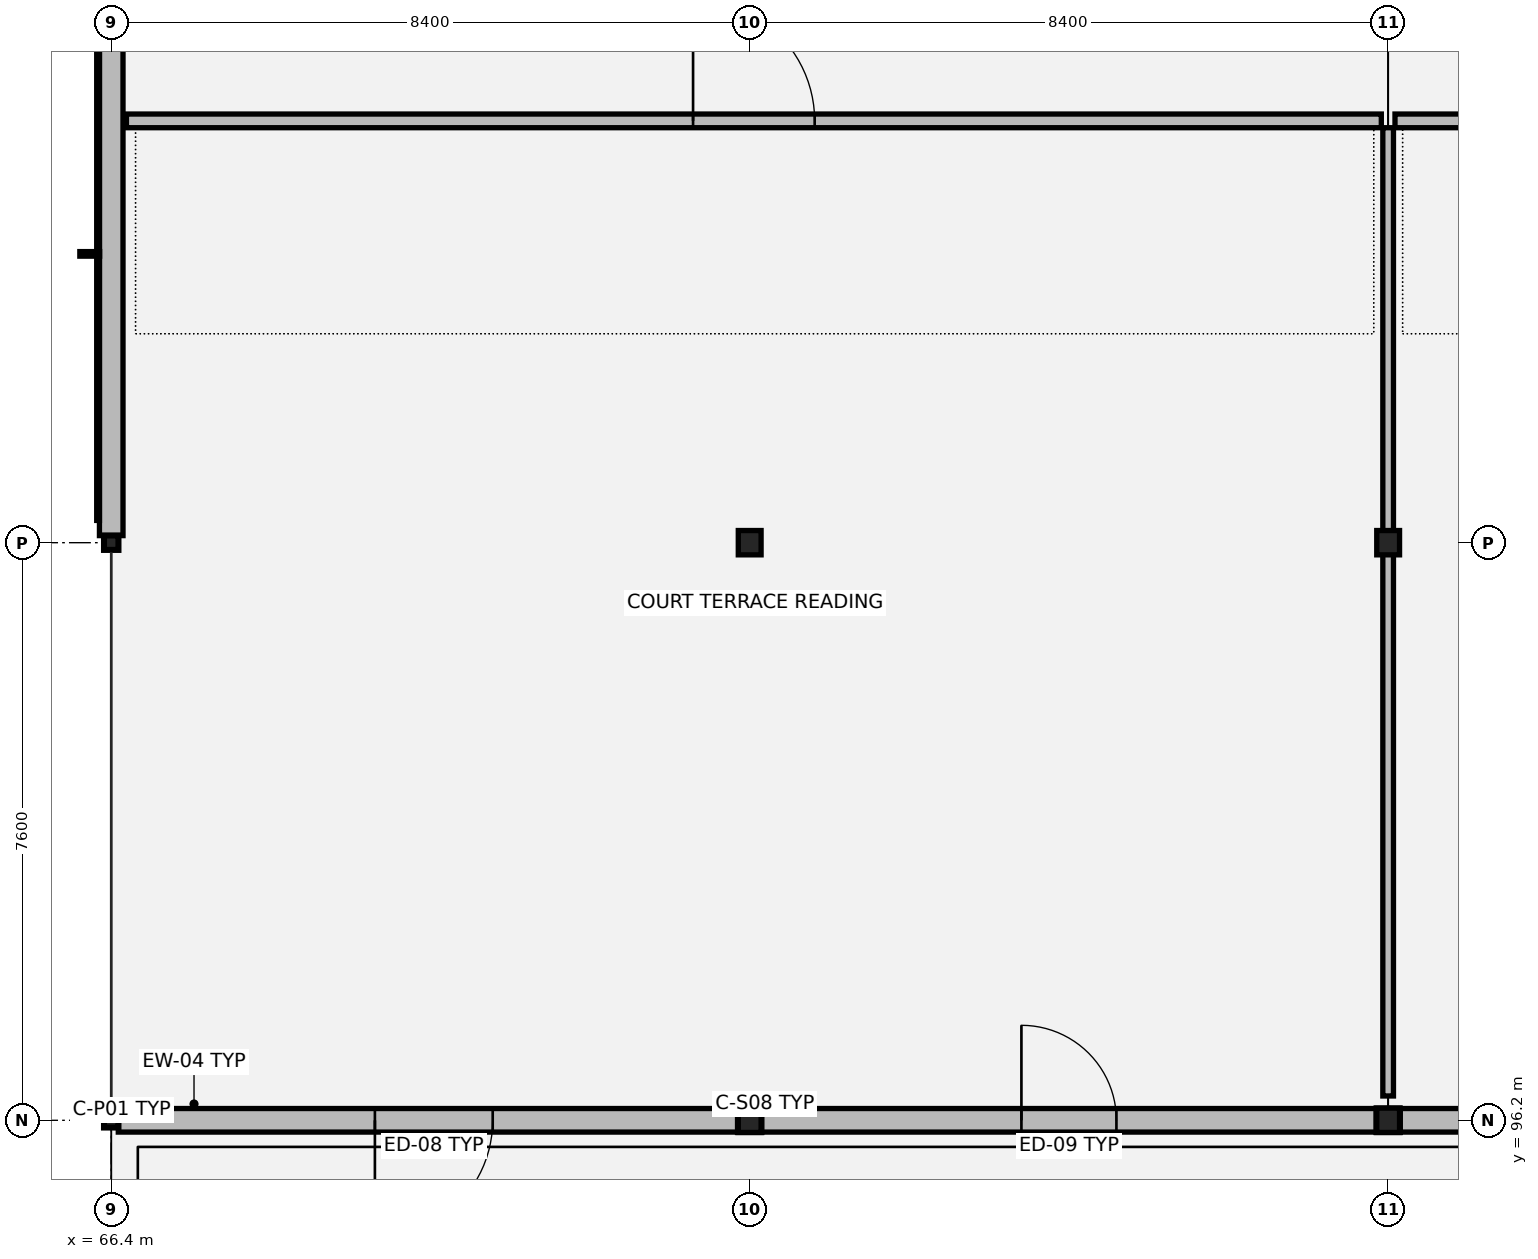
"""IFC4 building model, lengths in metres.
Left out: names, types, materials, properties, quantities, classifications, styles, units other than length and angle.
Written with IfcOpenShell. Run it as: python <this file> out.ifc"""

import sys

from ifc_helpers import new_model, si_unit, direction, frame, frame_2d, origin, origin_2d, place, context, subcontext, project, spatial, rectangle, hollow_rectangle, i_section, extrude, element, fill, save


model = new_model("IFC4")
c1 = context("Model", 3, precision=1e-05, world=origin(), true_north=direction((0.0, 1.0)))
c2 = subcontext(c1, "Body", "Model", "MODEL_VIEW")
j1 = project(units=[si_unit("LENGTHUNIT", "METRE"), si_unit("PLANEANGLEUNIT", "RADIAN")], contexts=[c1])
p1 = place(None, origin())
s1 = spatial("IfcSite", under=j1, at=p1, CompositionType="ELEMENT")
p2 = place(p1, origin())
s2 = spatial("IfcBuilding", under=s1, at=p2, CompositionType="ELEMENT")
p3 = place(p2, frame((0.0, 0.0, 17.34)))
s3 = spatial("IfcBuildingStorey", under=s2, at=p3, CompositionType="ELEMENT", Elevation=17.34)
for number, where, z_axis, x_axis in (
    (1, (66.4, 96.2, 0.0), (0.0, 0.0, 1.0), (1.0, 0.0, 0.0)),
    (2, (66.4, 103.8, 0.0), (0.0, 0.0, 1.0), (1.0, 0.0, 0.0)),
):
    element("IfcColumn", number, at=place(p3, frame(where, z_axis=z_axis, x_axis=x_axis)), inside=s3, PredefinedType="COLUMN", context=c2, shape_type="SweptSolid", body=[
        extrude(hollow_rectangle(XDim=0.18, YDim=0.18, WallThickness=0.01, at=origin_2d()), origin(), (0.0, 0.0, 1.0), 3.875),
    ])
p4 = place(p3, frame((74.8, 96.2, 0.0), z_axis=(0.0, 0.0, 1.0), x_axis=(1.0, 0.0, 0.0)))
e3 = element("IfcColumn", 3, at=p4, inside=s3, PredefinedType="COLUMN", context=c2, shape_type="SweptSolid", body=[
    extrude(i_section(OverallWidth=0.3, OverallDepth=0.32, WebThickness=0.011, FlangeThickness=0.021, at=origin_2d()), origin(), (0.0, 0.0, 1.0), 3.875),
])
p5 = place(p3, frame((74.8, 103.8, 0.0), z_axis=(0.0, 0.0, 1.0), x_axis=(1.0, 0.0, 0.0)))
e4 = element("IfcColumn", 4, at=p5, inside=s3, PredefinedType="COLUMN", context=c2, shape_type="SweptSolid", body=[
    extrude(i_section(OverallWidth=0.3, OverallDepth=0.32, WebThickness=0.011, FlangeThickness=0.021, at=origin_2d()), origin(), (0.0, 0.0, 1.0), 4.055),
])
p6 = place(p3, frame((83.2, 96.2, 0.0), z_axis=(0.0, 0.0, 1.0), x_axis=(1.0, 0.0, 0.0)))
e5 = element("IfcColumn", 5, at=p6, inside=s3, PredefinedType="COLUMN", context=c2, shape_type="SweptSolid", body=[
    extrude(i_section(OverallWidth=0.3, OverallDepth=0.32, WebThickness=0.011, FlangeThickness=0.021, at=origin_2d()), origin(), (0.0, 0.0, 1.0), 3.875),
])
p7 = place(p3, frame((83.2, 103.8, 0.0), z_axis=(0.0, 0.0, 1.0), x_axis=(1.0, 0.0, 0.0)))
e6 = element("IfcColumn", 6, at=p7, inside=s3, PredefinedType="COLUMN", context=c2, shape_type="SweptSolid", body=[
    extrude(i_section(OverallWidth=0.3, OverallDepth=0.32, WebThickness=0.011, FlangeThickness=0.021, at=origin_2d()), origin(), (0.0, 0.0, 1.0), 4.055),
])
p8 = place(p3, frame((66.493, 96.2, 0.0), z_axis=(0.0, 0.0, 1.0), x_axis=(1.0, 0.0, 0.0)))
e7 = element("IfcWall", 7, at=p8, inside=s3, PredefinedType="SOLIDWALL", context=c2, shape_type="SweptSolid", body=[
    extrude(rectangle(XDim=8.302, YDim=0.31, at=frame_2d((4.151, 0.0))), origin(), (0.0, 0.0, 1.0), 3.27),
])
p9 = place(p8, frame((3.376, 0.0, 0.0)))
e8 = element("IfcOpeningElement", 8, at=p9, cuts=e7, PredefinedType="OPENING", context=c2, shape_type="SweptSolid", body=[
    extrude(rectangle(XDim=1.55, YDim=2.28, at=frame_2d((0.775, 1.14))), frame((0.0, 0.165, 0.0), z_axis=(0.0, -1.0, 0.0), x_axis=(1.0, 0.0, 0.0)), (0.0, 0.0, 1.0), 0.33),
])
p10 = place(p3, frame((74.805, 96.2, 0.0), z_axis=(0.0, 0.0, 1.0), x_axis=(1.0, 0.0, 0.0)))
e9 = element("IfcWall", 9, at=p10, inside=s3, PredefinedType="SOLIDWALL", context=c2, shape_type="SweptSolid", body=[
    extrude(rectangle(XDim=8.39, YDim=0.31, at=frame_2d((4.195, 0.0))), origin(), (0.0, 0.0, 1.0), 3.27),
])
p11 = place(p10, frame((3.57, 0.0, 0.0)))
e10 = element("IfcOpeningElement", 10, at=p11, cuts=e9, PredefinedType="OPENING", context=c2, shape_type="SweptSolid", body=[
    extrude(rectangle(XDim=1.25, YDim=2.2, at=frame_2d((0.625, 1.1))), frame((0.0, 0.165, 0.0), z_axis=(0.0, -1.0, 0.0), x_axis=(1.0, 0.0, 0.0)), (0.0, 0.0, 1.0), 0.33),
])
p12 = place(p3, frame((83.205, 96.2, 0.0), z_axis=(0.0, 0.0, 1.0), x_axis=(1.0, 0.0, 0.0)))
e11 = element("IfcWall", 11, at=p12, inside=s3, PredefinedType="SOLIDWALL", context=c2, shape_type="SweptSolid", body=[
    extrude(rectangle(XDim=8.39, YDim=0.31, at=frame_2d((4.195, 0.0))), origin(), (0.0, 0.0, 1.0), 3.27),
])
p13 = place(p12, frame((3.535, 0.0, 0.0)))
e12 = element("IfcOpeningElement", 12, at=p13, cuts=e11, PredefinedType="OPENING", context=c2, shape_type="SweptSolid", body=[
    extrude(rectangle(XDim=1.32, YDim=2.22, at=frame_2d((0.66, 1.11))), frame((0.0, 0.165, 0.0), z_axis=(0.0, -1.0, 0.0), x_axis=(1.0, 0.0, 0.0)), (0.0, 0.0, 1.0), 0.33),
])
p14 = place(p3, frame((66.4, 111.307, 0.0), z_axis=(0.0, 0.0, 1.0), x_axis=(0.0, -1.0, 0.0)))
e13 = element("IfcWall", 13, at=p14, inside=s3, PredefinedType="SOLIDWALL", context=c2, shape_type="SweptSolid", body=[
    extrude(rectangle(XDim=7.414, YDim=0.31, at=frame_2d((3.707, 0.0))), origin(), (0.0, 0.0, 1.0), 3.48),
])
p15 = place(p3, frame((66.6, 109.35, 0.0), z_axis=(0.0, 0.0, 1.0), x_axis=(1.0, 0.0, 0.0)))
e14 = element("IfcWall", 14, at=p15, inside=s3, PredefinedType="PARTITIONING", context=c2, shape_type="SweptSolid", body=[
    extrude(rectangle(XDim=16.51, YDim=0.18, at=frame_2d((8.255, 0.0))), origin(), (0.0, 0.0, 1.0), 3.18),
])
p16 = place(p15, frame((7.455, 0.0, 0.0)))
e15 = element("IfcOpeningElement", 15, at=p16, cuts=e14, PredefinedType="OPENING", context=c2, shape_type="SweptSolid", body=[
    extrude(rectangle(XDim=1.6, YDim=2.25, at=frame_2d((0.8, 1.125))), frame((0.0, 0.1, 0.0), z_axis=(0.0, -1.0, 0.0), x_axis=(1.0, 0.0, 0.0)), (0.0, 0.0, 1.0), 0.2),
])
p17 = place(p3, frame((83.29, 109.35, 0.0), z_axis=(0.0, 0.0, 1.0), x_axis=(1.0, 0.0, 0.0)))
e16 = element("IfcWall", 16, at=p17, inside=s3, PredefinedType="PARTITIONING", context=c2, shape_type="SweptSolid", body=[
    extrude(rectangle(XDim=8.22, YDim=0.18, at=frame_2d((4.11, 0.0))), origin(), (0.0, 0.0, 1.0), 3.18),
])
p18 = place(p17, frame((3.43, 0.0, 0.0)))
e17 = element("IfcOpeningElement", 17, at=p18, cuts=e16, PredefinedType="OPENING", context=c2, shape_type="SweptSolid", body=[
    extrude(rectangle(XDim=1.36, YDim=2.2, at=frame_2d((0.68, 1.1))), frame((0.0, 0.1, 0.0), z_axis=(0.0, -1.0, 0.0), x_axis=(1.0, 0.0, 0.0)), (0.0, 0.0, 1.0), 0.2),
])
p19 = place(p3, frame((83.2, 96.52, 0.0), z_axis=(0.0, 0.0, 1.0), x_axis=(0.0, 1.0, 0.0)))
e18 = element("IfcWall", 18, at=p19, inside=s3, PredefinedType="PARTITIONING", context=c2, shape_type="SweptSolid", body=[
    extrude(rectangle(XDim=12.74, YDim=0.14, at=frame_2d((6.37, 0.0))), origin(), (0.0, 0.0, 1.0), 3.18),
])
p20 = place(p9, origin())
e19 = element("IfcDoor", 19, at=p20, inside=s3, OperationType="SINGLE_SWING_RIGHT", PredefinedType="DOOR", context=c2, shape_type="SweptSolid", body=[
    extrude(rectangle(XDim=1.55, YDim=2.28, at=frame_2d((0.775, 1.14))), frame((0.0, 0.025, 0.0), z_axis=(0.0, -1.0, 0.0), x_axis=(1.0, 0.0, 0.0)), (0.0, 0.0, 1.0), 0.05),
])
fill(e8, e19)
p21 = place(p11, origin())
e20 = element("IfcDoor", 20, at=p21, inside=s3, OperationType="SINGLE_SWING_LEFT", PredefinedType="DOOR", context=c2, shape_type="SweptSolid", body=[
    extrude(rectangle(XDim=1.25, YDim=2.2, at=frame_2d((0.625, 1.1))), frame((0.0, 0.025, 0.0), z_axis=(0.0, -1.0, 0.0), x_axis=(1.0, 0.0, 0.0)), (0.0, 0.0, 1.0), 0.05),
])
fill(e10, e20)
p22 = place(p16, origin())
e21 = element("IfcDoor", 21, at=p22, inside=s3, OperationType="DOUBLE_DOOR_SINGLE_SWING", PredefinedType="DOOR", context=c2, shape_type="SweptSolid", body=[
    extrude(rectangle(XDim=1.6, YDim=2.25, at=frame_2d((0.8, 1.125))), frame((0.0, 0.025, 0.0), z_axis=(0.0, -1.0, 0.0), x_axis=(1.0, 0.0, 0.0)), (0.0, 0.0, 1.0), 0.05),
])
fill(e15, e21)
save(model, sys.argv[1])
